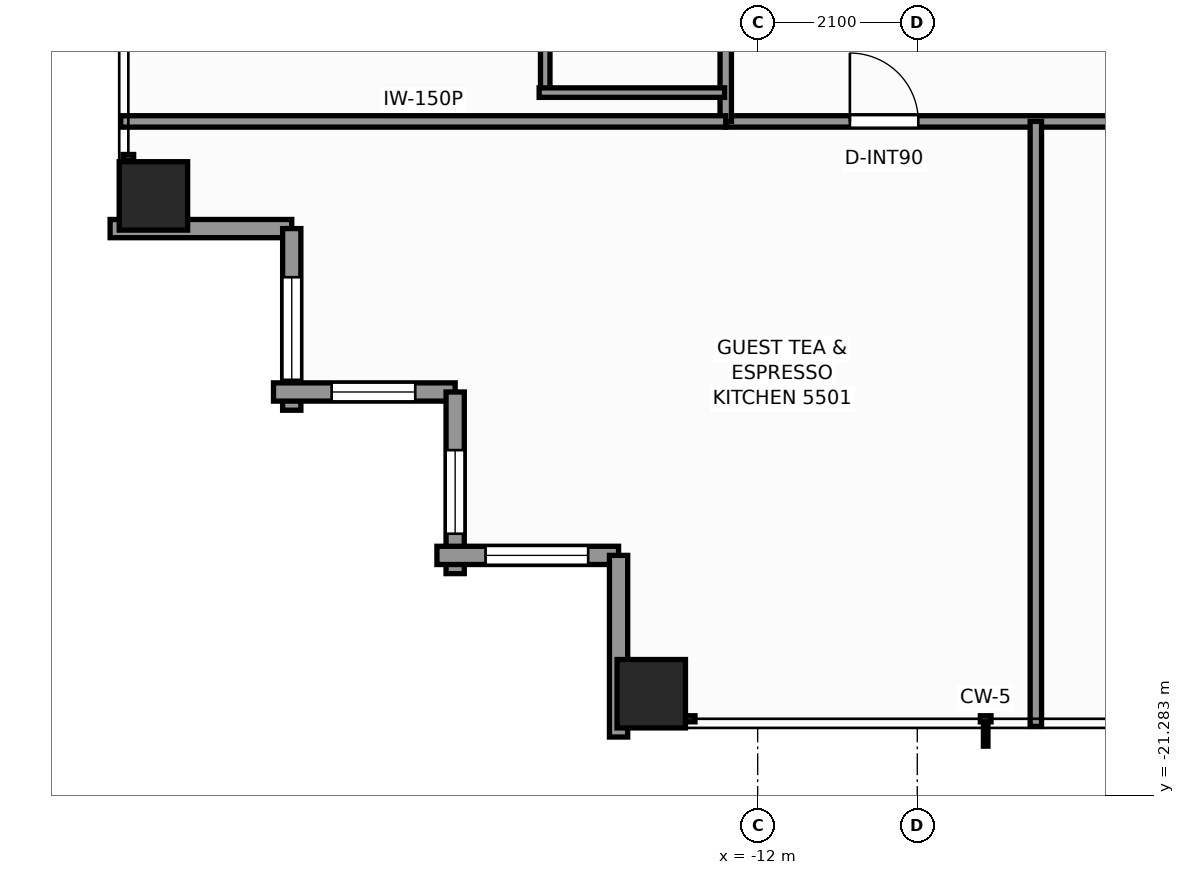
"""IFC4 building model, lengths in metres.
Left out: names, types, materials, properties, quantities, classifications, styles, units other than length and angle.
Written with IfcOpenShell. Run it as: python <this file> out.ifc"""

import sys

from ifc_helpers import new_model, si_unit, direction, frame, frame_2d, origin, origin_2d, place, context, subcontext, project, spatial, rectangle, extrude, element, fill, save


model = new_model("IFC4")
c1 = context("Model", 3, precision=1e-05, world=origin(), true_north=direction((0.0, 1.0)))
c2 = subcontext(c1, "Body", "Model", "MODEL_VIEW")
j1 = project(units=[si_unit("LENGTHUNIT", "METRE"), si_unit("PLANEANGLEUNIT", "RADIAN")], contexts=[c1])
p1 = place(None, origin())
s1 = spatial("IfcSite", under=j1, at=p1, CompositionType="ELEMENT")
p2 = place(p1, origin())
s2 = spatial("IfcBuilding", under=s1, at=p2, CompositionType="ELEMENT")
p3 = place(p2, frame((0.0, 0.0, 189.9)))
s3 = spatial("IfcBuildingStorey", under=s2, at=p3, CompositionType="ELEMENT", Elevation=189.9)
for number, where, z_axis, x_axis in (
    (1, (-13.4, -19.95, 0.0), (0.0, 0.0, 1.0), (1.0, 0.0, 0.0)),
    (2, (-19.95, -13.4, 0.0), (0.0, 0.0, 1.0), (1.0, 0.0, 0.0)),
):
    element("IfcColumn", number, at=place(p3, frame(where, z_axis=z_axis, x_axis=x_axis)), inside=s3, PredefinedType="COLUMN", context=c2, shape_type="SweptSolid", body=[
        extrude(rectangle(XDim=0.9, YDim=0.9, at=origin_2d()), origin(), (0.0, 0.0, 1.0), 3.3),
    ])
p4 = place(p3, frame((-18.13, -13.83, 0.0), z_axis=(0.0, 0.0, 1.0), x_axis=(-1.0, 0.0, 0.0)))
e3 = element("IfcWall", 3, at=p4, inside=s3, PredefinedType="STANDARD", context=c2, shape_type="SweptSolid", body=[
    extrude(rectangle(XDim=2.39, YDim=0.24, at=frame_2d((1.195, 0.0))), origin(), (0.0, 0.0, 1.0), 2.463),
])
p5 = place(p3, frame((-18.13, -16.22, 0.0), z_axis=(0.0, 0.0, 1.0), x_axis=(0.0, 1.0, 0.0)))
e4 = element("IfcWall", 4, at=p5, inside=s3, PredefinedType="STANDARD", context=c2, shape_type="SweptSolid", body=[
    extrude(rectangle(XDim=2.39, YDim=0.24, at=frame_2d((1.195, 0.0))), origin(), (0.0, 0.0, 1.0), 2.463),
])
p6 = place(p5, frame((0.4, 0.0, 0.65)))
e5 = element("IfcOpeningElement", 5, at=p6, cuts=e4, PredefinedType="OPENING", context=c2, shape_type="SweptSolid", body=[
    extrude(rectangle(XDim=1.35, YDim=1.55, at=frame_2d((0.675, 0.775))), frame((0.0, 0.13, 0.0), z_axis=(0.0, -1.0, 0.0), x_axis=(1.0, 0.0, 0.0)), (0.0, 0.0, 1.0), 0.26),
])
p7 = place(p3, frame((-15.98, -15.98, 0.0), z_axis=(0.0, 0.0, 1.0), x_axis=(-1.0, 0.0, 0.0)))
e6 = element("IfcWall", 6, at=p7, inside=s3, PredefinedType="STANDARD", context=c2, shape_type="SweptSolid", body=[
    extrude(rectangle(XDim=2.39, YDim=0.24, at=frame_2d((1.195, 0.0))), origin(), (0.0, 0.0, 1.0), 2.463),
])
p8 = place(p7, frame((0.525, 0.0, 0.65)))
e7 = element("IfcOpeningElement", 7, at=p8, cuts=e6, PredefinedType="OPENING", context=c2, shape_type="SweptSolid", body=[
    extrude(rectangle(XDim=1.1, YDim=1.45, at=frame_2d((0.55, 0.725))), frame((0.0, 0.13, 0.0), z_axis=(0.0, -1.0, 0.0), x_axis=(1.0, 0.0, 0.0)), (0.0, 0.0, 1.0), 0.26),
])
p9 = place(p3, frame((-15.98, -18.37, 0.0), z_axis=(0.0, 0.0, 1.0), x_axis=(0.0, 1.0, 0.0)))
e8 = element("IfcWall", 8, at=p9, inside=s3, PredefinedType="STANDARD", context=c2, shape_type="SweptSolid", body=[
    extrude(rectangle(XDim=2.39, YDim=0.24, at=frame_2d((1.195, 0.0))), origin(), (0.0, 0.0, 1.0), 2.463),
])
p10 = place(p9, frame((0.525, 0.0, 0.65)))
e9 = element("IfcOpeningElement", 9, at=p10, cuts=e8, PredefinedType="OPENING", context=c2, shape_type="SweptSolid", body=[
    extrude(rectangle(XDim=1.1, YDim=1.45, at=frame_2d((0.55, 0.725))), frame((0.0, 0.13, 0.0), z_axis=(0.0, -1.0, 0.0), x_axis=(1.0, 0.0, 0.0)), (0.0, 0.0, 1.0), 0.26),
])
p11 = place(p3, frame((-13.83, -18.13, 0.0), z_axis=(0.0, 0.0, 1.0), x_axis=(-1.0, 0.0, 0.0)))
e10 = element("IfcWall", 10, at=p11, inside=s3, PredefinedType="STANDARD", context=c2, shape_type="SweptSolid", body=[
    extrude(rectangle(XDim=2.39, YDim=0.24, at=frame_2d((1.195, 0.0))), origin(), (0.0, 0.0, 1.0), 2.463),
])
p12 = place(p11, frame((0.4, 0.0, 0.65)))
e11 = element("IfcOpeningElement", 11, at=p12, cuts=e10, PredefinedType="OPENING", context=c2, shape_type="SweptSolid", body=[
    extrude(rectangle(XDim=1.35, YDim=1.55, at=frame_2d((0.675, 0.775))), frame((0.0, 0.13, 0.0), z_axis=(0.0, -1.0, 0.0), x_axis=(1.0, 0.0, 0.0)), (0.0, 0.0, 1.0), 0.26),
])
p13 = place(p3, frame((-13.83, -20.52, 0.0), z_axis=(0.0, 0.0, 1.0), x_axis=(0.0, 1.0, 0.0)))
e12 = element("IfcWall", 12, at=p13, inside=s3, PredefinedType="STANDARD", context=c2, shape_type="SweptSolid", body=[
    extrude(rectangle(XDim=2.39, YDim=0.24, at=frame_2d((1.195, 0.0))), origin(), (0.0, 0.0, 1.0), 2.463),
])
p14 = place(p3, frame((-12.42, -12.42, 0.0), z_axis=(0.0, 0.0, 1.0), x_axis=(1.0, 0.0, 0.0)))
e13 = element("IfcWall", 13, at=p14, inside=s3, PredefinedType="PARTITIONING", context=c2, shape_type="SweptSolid", body=[
    extrude(rectangle(XDim=25.0, YDim=0.15, at=frame_2d((12.5, 0.0))), origin(), (0.0, 0.0, 1.0), 2.369),
])
p15 = place(p14, frame((1.633, 0.0, 0.0)))
e14 = element("IfcOpeningElement", 14, at=p15, cuts=e13, PredefinedType="OPENING", context=c2, shape_type="SweptSolid", body=[
    extrude(rectangle(XDim=0.9, YDim=2.06, at=frame_2d((0.45, 1.03))), frame((0.0, 0.085, 0.0), z_axis=(0.0, -1.0, 0.0), x_axis=(1.0, 0.0, 0.0)), (0.0, 0.0, 1.0), 0.17),
])
p16 = place(p14, frame((5.113, 0.0, 0.0)))
e15 = element("IfcOpeningElement", 15, at=p16, cuts=e13, PredefinedType="OPENING", context=c2, shape_type="SweptSolid", body=[
    extrude(rectangle(XDim=0.9, YDim=2.06, at=frame_2d((0.45, 1.03))), frame((0.0, 0.085, 0.0), z_axis=(0.0, -1.0, 0.0), x_axis=(1.0, 0.0, 0.0)), (0.0, 0.0, 1.0), 0.17),
])
p17 = place(p14, frame((8.892, 0.0, 0.0)))
e16 = element("IfcOpeningElement", 16, at=p17, cuts=e13, PredefinedType="OPENING", context=c2, shape_type="SweptSolid", body=[
    extrude(rectangle(XDim=0.9, YDim=2.06, at=frame_2d((0.45, 1.03))), frame((0.0, 0.085, 0.0), z_axis=(0.0, -1.0, 0.0), x_axis=(1.0, 0.0, 0.0)), (0.0, 0.0, 1.0), 0.17),
])
p18 = place(p14, frame((13.097, 0.0, 0.0)))
e17 = element("IfcOpeningElement", 17, at=p18, cuts=e13, PredefinedType="OPENING", context=c2, shape_type="SweptSolid", body=[
    extrude(rectangle(XDim=0.95, YDim=2.06, at=frame_2d((0.475, 1.03))), frame((0.0, 0.085, 0.0), z_axis=(0.0, -1.0, 0.0), x_axis=(1.0, 0.0, 0.0)), (0.0, 0.0, 1.0), 0.17),
])
p19 = place(p14, frame((18.646, 0.0, 0.0)))
e18 = element("IfcOpeningElement", 18, at=p19, cuts=e13, PredefinedType="OPENING", context=c2, shape_type="SweptSolid", body=[
    extrude(rectangle(XDim=0.9, YDim=2.06, at=frame_2d((0.45, 1.03))), frame((0.0, 0.085, 0.0), z_axis=(0.0, -1.0, 0.0), x_axis=(1.0, 0.0, 0.0)), (0.0, 0.0, 1.0), 0.17),
])
p20 = place(p14, frame((20.981, 0.0, 0.0)))
e19 = element("IfcOpeningElement", 19, at=p20, cuts=e13, PredefinedType="OPENING", context=c2, shape_type="SweptSolid", body=[
    extrude(rectangle(XDim=0.9, YDim=2.06, at=frame_2d((0.45, 1.03))), frame((0.0, 0.085, 0.0), z_axis=(0.0, -1.0, 0.0), x_axis=(1.0, 0.0, 0.0)), (0.0, 0.0, 1.0), 0.17),
])
p21 = place(p3, frame((-12.42, -12.42, 0.0), z_axis=(0.0, 0.0, 1.0), x_axis=(0.0, 1.0, 0.0)))
e20 = element("IfcWall", 20, at=p21, inside=s3, PredefinedType="PARTITIONING", context=c2, shape_type="SweptSolid", body=[
    extrude(rectangle(XDim=24.84, YDim=0.15, at=frame_2d((12.42, 0.0))), origin(), (0.0, 0.0, 1.0), 2.369),
])
p22 = place(p21, frame((3.323, 0.0, 0.0)))
e21 = element("IfcOpeningElement", 21, at=p22, cuts=e20, PredefinedType="OPENING", context=c2, shape_type="SweptSolid", body=[
    extrude(rectangle(XDim=0.95, YDim=2.06, at=frame_2d((0.475, 1.03))), frame((0.0, 0.085, 0.0), z_axis=(0.0, -1.0, 0.0), x_axis=(1.0, 0.0, 0.0)), (0.0, 0.0, 1.0), 0.17),
])
p23 = place(p21, frame((9.039, 0.0, 0.0)))
e22 = element("IfcOpeningElement", 22, at=p23, cuts=e20, PredefinedType="OPENING", context=c2, shape_type="SweptSolid", body=[
    extrude(rectangle(XDim=0.95, YDim=2.06, at=frame_2d((0.475, 1.03))), frame((0.0, 0.085, 0.0), z_axis=(0.0, -1.0, 0.0), x_axis=(1.0, 0.0, 0.0)), (0.0, 0.0, 1.0), 0.17),
])
p24 = place(p21, frame((14.341, 0.0, 0.0)))
e23 = element("IfcOpeningElement", 23, at=p24, cuts=e20, PredefinedType="OPENING", context=c2, shape_type="SweptSolid", body=[
    extrude(rectangle(XDim=0.95, YDim=2.06, at=frame_2d((0.475, 1.03))), frame((0.0, 0.085, 0.0), z_axis=(0.0, -1.0, 0.0), x_axis=(1.0, 0.0, 0.0)), (0.0, 0.0, 1.0), 0.17),
])
p25 = place(p21, frame((20.375, 0.0, 0.0)))
e24 = element("IfcOpeningElement", 24, at=p25, cuts=e20, PredefinedType="OPENING", context=c2, shape_type="SweptSolid", body=[
    extrude(rectangle(XDim=0.95, YDim=2.06, at=frame_2d((0.475, 1.03))), frame((0.0, 0.085, 0.0), z_axis=(0.0, -1.0, 0.0), x_axis=(1.0, 0.0, 0.0)), (0.0, 0.0, 1.0), 0.17),
])
p26 = place(p3, frame((-20.38, -12.42, 0.0), z_axis=(0.0, 0.0, 1.0), x_axis=(1.0, 0.0, 0.0)))
e25 = element("IfcWall", 25, at=p26, inside=s3, PredefinedType="PARTITIONING", context=c2, shape_type="SweptSolid", body=[
    extrude(rectangle(XDim=7.96, YDim=0.15, at=frame_2d((3.98, 0.0))), origin(), (0.0, 0.0, 1.0), 2.369),
])
p27 = place(p3, frame((-8.34, -20.38, 0.0), z_axis=(0.0, 0.0, 1.0), x_axis=(0.0, 1.0, 0.0)))
e26 = element("IfcWall", 26, at=p27, inside=s3, PredefinedType="PARTITIONING", context=c2, shape_type="SweptSolid", body=[
    extrude(rectangle(XDim=7.96, YDim=0.15, at=frame_2d((3.98, 0.0))), origin(), (0.0, 0.0, 1.0), 2.453),
])
p28 = place(p3, frame((-14.795, -12.101, 0.0), z_axis=(0.0, 0.0, 1.0), x_axis=(0.0, 1.0, 0.0)))
e27 = element("IfcWall", 27, at=p28, inside=s3, PredefinedType="PARTITIONING", context=c2, shape_type="SweptSolid", body=[
    extrude(rectangle(XDim=2.27, YDim=0.125, at=frame_2d((1.135, 0.0))), origin(), (0.0, 0.0, 1.0), 2.369),
])
p29 = place(p3, frame((-14.875, -12.041, 0.0), z_axis=(0.0, 0.0, 1.0), x_axis=(1.0, 0.0, 0.0)))
e28 = element("IfcWall", 28, at=p29, inside=s3, PredefinedType="PARTITIONING", context=c2, shape_type="SweptSolid", body=[
    extrude(rectangle(XDim=2.44, YDim=0.125, at=frame_2d((1.22, 0.0))), origin(), (0.0, 0.0, 1.0), 3.08),
])
p30 = place(p6, origin())
e29 = element("IfcWindow", 29, at=p30, inside=s3, PartitioningType="SINGLE_PANEL", PredefinedType="WINDOW", context=c2, shape_type="SweptSolid", body=[
    extrude(rectangle(XDim=1.35, YDim=1.55, at=frame_2d((0.675, 0.775))), frame((0.0, 0.03, 0.0), z_axis=(0.0, -1.0, 0.0), x_axis=(1.0, 0.0, 0.0)), (0.0, 0.0, 1.0), 0.06),
])
fill(e5, e29)
p31 = place(p8, origin())
e30 = element("IfcWindow", 30, at=p31, inside=s3, PartitioningType="SINGLE_PANEL", PredefinedType="WINDOW", context=c2, shape_type="SweptSolid", body=[
    extrude(rectangle(XDim=1.1, YDim=1.45, at=frame_2d((0.55, 0.725))), frame((0.0, 0.03, 0.0), z_axis=(0.0, -1.0, 0.0), x_axis=(1.0, 0.0, 0.0)), (0.0, 0.0, 1.0), 0.06),
])
fill(e7, e30)
p32 = place(p10, origin())
e31 = element("IfcWindow", 31, at=p32, inside=s3, PartitioningType="SINGLE_PANEL", PredefinedType="WINDOW", context=c2, shape_type="SweptSolid", body=[
    extrude(rectangle(XDim=1.1, YDim=1.45, at=frame_2d((0.55, 0.725))), frame((0.0, 0.03, 0.0), z_axis=(0.0, -1.0, 0.0), x_axis=(1.0, 0.0, 0.0)), (0.0, 0.0, 1.0), 0.06),
])
fill(e9, e31)
p33 = place(p12, origin())
e32 = element("IfcWindow", 32, at=p33, inside=s3, PartitioningType="SINGLE_PANEL", PredefinedType="WINDOW", context=c2, shape_type="SweptSolid", body=[
    extrude(rectangle(XDim=1.35, YDim=1.55, at=frame_2d((0.675, 0.775))), frame((0.0, 0.03, 0.0), z_axis=(0.0, -1.0, 0.0), x_axis=(1.0, 0.0, 0.0)), (0.0, 0.0, 1.0), 0.06),
])
fill(e11, e32)
p34 = place(p15, origin())
e33 = element("IfcDoor", 33, at=p34, inside=s3, OperationType="SINGLE_SWING_LEFT", PredefinedType="DOOR", context=c2, shape_type="SweptSolid", body=[
    extrude(rectangle(XDim=0.9, YDim=2.06, at=frame_2d((0.45, 1.03))), frame((0.0, 0.025, 0.0), z_axis=(0.0, -1.0, 0.0), x_axis=(1.0, 0.0, 0.0)), (0.0, 0.0, 1.0), 0.05),
])
fill(e14, e33)
save(model, sys.argv[1])
